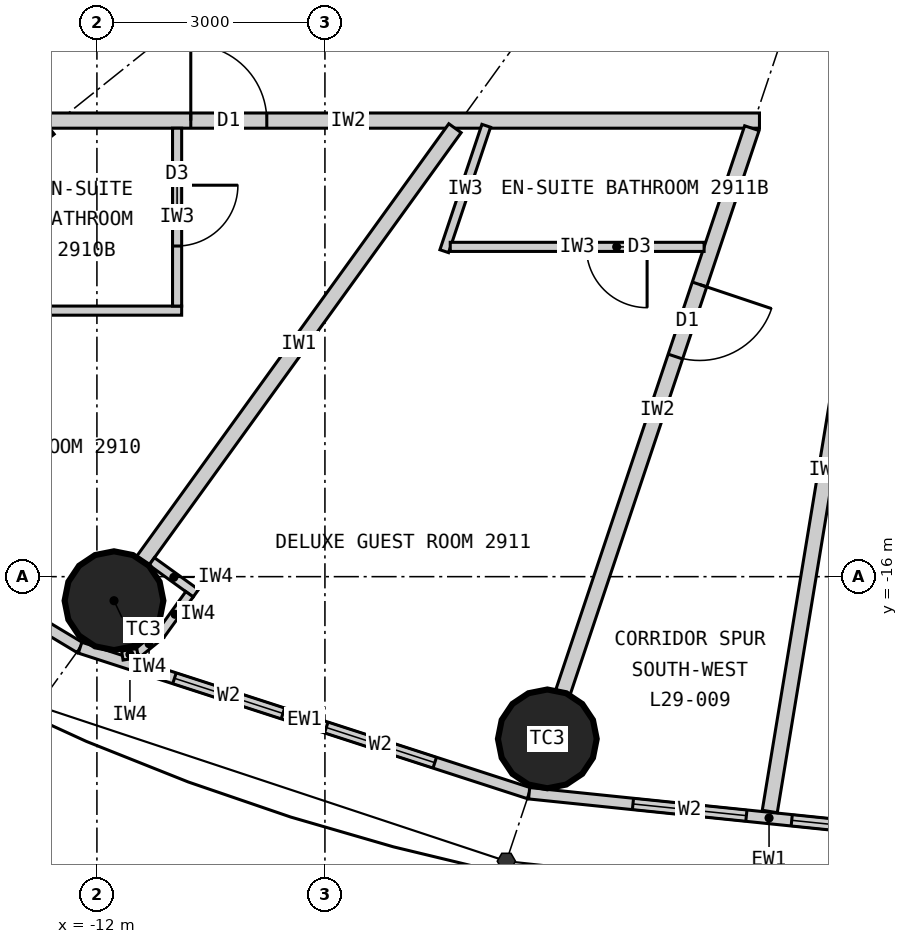
"""IFC4 building model, lengths in metres.
Left out: names, types, materials, properties, quantities, classifications, styles, units other than length and angle.
Written with IfcOpenShell. Run it as: python <this file> out.ifc"""

import sys

from ifc_helpers import new_model, si_unit, direction, frame, frame_2d, origin, origin_2d, place, context, subcontext, project, spatial, rectangle, circle, extrude, element, fill, save


model = new_model("IFC4")
c1 = context("Model", 3, precision=1e-05, world=origin(), true_north=direction((0.0, 1.0)))
c2 = subcontext(c1, "Body", "Model", "MODEL_VIEW")
j1 = project(units=[si_unit("LENGTHUNIT", "METRE"), si_unit("PLANEANGLEUNIT", "RADIAN")], contexts=[c1])
p1 = place(None, origin())
s1 = spatial("IfcSite", under=j1, at=p1, CompositionType="ELEMENT")
p2 = place(p1, origin())
s2 = spatial("IfcBuilding", under=s1, at=p2, CompositionType="ELEMENT")
p3 = place(p2, frame((0.0, 0.0, 115.5)))
s3 = spatial("IfcBuildingStorey", under=s2, at=p3, CompositionType="ELEMENT", Elevation=115.5)
for number, where, z_axis, x_axis in (
    (1, (-11.775, -16.316, 0.0), (0.0, 0.0, 1.0), (1.0, 0.0, 0.0)),
    (2, (-6.074, -18.135, 0.0), (0.0, 0.0, 1.0), (1.0, 0.0, 0.0)),
):
    element("IfcColumn", number, at=place(p3, frame(where, z_axis=z_axis, x_axis=x_axis)), inside=s3, PredefinedType="COLUMN", context=c2, shape_type="SweptSolid", body=[
        extrude(circle(Radius=0.65, at=origin_2d()), origin(), (0.0, 0.0, 1.0), 3.3),
    ])
p4 = place(p3, frame((-17.332, -13.866, 0.0), z_axis=(0.0, 0.0, 1.0), x_axis=(0.857308573723, -0.514802884044, 0.0)))
e3 = element("IfcWall", 3, at=p4, inside=s3, PredefinedType="ELEMENTEDWALL", context=c2, shape_type="SweptSolid", body=[
    extrude(rectangle(XDim=5.961, YDim=0.15, at=frame_2d((2.98, 0.0))), origin(), (0.0, 0.0, 1.0), 3.12),
])
p5 = place(p4, frame((1.181, 0.0, 0.9)))
e4 = element("IfcOpeningElement", 4, at=p5, cuts=e3, PredefinedType="OPENING", context=c2, shape_type="SweptSolid", body=[
    extrude(rectangle(XDim=1.5, YDim=1.9, at=frame_2d((0.75, 0.95))), frame((0.0, 0.085, 0.0), z_axis=(0.0, -1.0, 0.0), x_axis=(1.0, 0.0, 0.0)), (0.0, 0.0, 1.0), 0.17),
])
p6 = place(p4, frame((3.281, 0.0, 0.9)))
e5 = element("IfcOpeningElement", 5, at=p6, cuts=e3, PredefinedType="OPENING", context=c2, shape_type="SweptSolid", body=[
    extrude(rectangle(XDim=1.5, YDim=1.9, at=frame_2d((0.75, 0.95))), frame((0.0, 0.085, 0.0), z_axis=(0.0, -1.0, 0.0), x_axis=(1.0, 0.0, 0.0)), (0.0, 0.0, 1.0), 0.17),
])
p7 = place(p3, frame((-12.221, -16.935, 0.0), z_axis=(0.0, 0.0, 1.0), x_axis=(0.951272691506, -0.308350881944, 0.0)))
e6 = element("IfcWall", 6, at=p7, inside=s3, PredefinedType="ELEMENTEDWALL", context=c2, shape_type="SweptSolid", body=[
    extrude(rectangle(XDim=6.211, YDim=0.15, at=frame_2d((3.105, 0.0))), origin(), (0.0, 0.0, 1.0), 3.12),
])
p8 = place(p7, frame((1.305, 0.0, 0.9)))
e7 = element("IfcOpeningElement", 7, at=p8, cuts=e6, PredefinedType="OPENING", context=c2, shape_type="SweptSolid", body=[
    extrude(rectangle(XDim=1.5, YDim=1.9, at=frame_2d((0.75, 0.95))), frame((0.0, 0.085, 0.0), z_axis=(0.0, -1.0, 0.0), x_axis=(1.0, 0.0, 0.0)), (0.0, 0.0, 1.0), 0.17),
])
p9 = place(p7, frame((3.405, 0.0, 0.9)))
e8 = element("IfcOpeningElement", 8, at=p9, cuts=e6, PredefinedType="OPENING", context=c2, shape_type="SweptSolid", body=[
    extrude(rectangle(XDim=1.5, YDim=1.9, at=frame_2d((0.75, 0.95))), frame((0.0, 0.085, 0.0), z_axis=(0.0, -1.0, 0.0), x_axis=(1.0, 0.0, 0.0)), (0.0, 0.0, 1.0), 0.17),
])
p10 = place(p3, frame((-6.313, -18.85, 0.0), z_axis=(0.0, 0.0, 1.0), x_axis=(0.994735690163, -0.102473931887, 0.0)))
e9 = element("IfcWall", 9, at=p10, inside=s3, PredefinedType="ELEMENTEDWALL", context=c2, shape_type="SweptSolid", body=[
    extrude(rectangle(XDim=6.347, YDim=0.15, at=frame_2d((3.173, 0.0))), origin(), (0.0, 0.0, 1.0), 3.12),
])
p11 = place(p10, frame((1.373, 0.0, 0.9)))
e10 = element("IfcOpeningElement", 10, at=p11, cuts=e9, PredefinedType="OPENING", context=c2, shape_type="SweptSolid", body=[
    extrude(rectangle(XDim=1.5, YDim=1.9, at=frame_2d((0.75, 0.95))), frame((0.0, 0.085, 0.0), z_axis=(0.0, -1.0, 0.0), x_axis=(1.0, 0.0, 0.0)), (0.0, 0.0, 1.0), 0.17),
])
p12 = place(p10, frame((3.473, 0.0, 0.9)))
e11 = element("IfcOpeningElement", 11, at=p12, cuts=e9, PredefinedType="OPENING", context=c2, shape_type="SweptSolid", body=[
    extrude(rectangle(XDim=1.5, YDim=1.9, at=frame_2d((0.75, 0.95))), frame((0.0, 0.085, 0.0), z_axis=(0.0, -1.0, 0.0), x_axis=(1.0, 0.0, 0.0)), (0.0, 0.0, 1.0), 0.17),
])
p13 = place(p3, frame((-3.283, -10.0, 0.0), z_axis=(0.0, 0.0, 1.0), x_axis=(-1.0, 0.0, 0.0)))
e12 = element("IfcWall", 12, at=p13, inside=s3, PredefinedType="PARTITIONING", context=c2, shape_type="SweptSolid", body=[
    extrude(rectangle(XDim=10.817, YDim=0.2, at=frame_2d((5.409, 0.0))), origin(), (0.0, 0.0, 1.0), 3.12),
])
p14 = place(p13, frame((6.482, 0.0, 0.0)))
e13 = element("IfcOpeningElement", 13, at=p14, cuts=e12, PredefinedType="OPENING", context=c2, shape_type="SweptSolid", body=[
    extrude(rectangle(XDim=1.0, YDim=2.2, at=frame_2d((0.5, 1.1))), frame((0.0, 0.11, 0.0), z_axis=(0.0, -1.0, 0.0), x_axis=(1.0, 0.0, 0.0)), (0.0, 0.0, 1.0), 0.22),
])
p15 = place(p3, frame((-12.625, -10.1, 0.0), z_axis=(0.0, 0.0, 1.0), x_axis=(-0.780863644897, -0.624701503182, 0.0)))
e14 = element("IfcWall", 14, at=p15, inside=s3, PredefinedType="PARTITIONING", context=c2, shape_type="SweptSolid", body=[
    extrude(rectangle(XDim=4.612, YDim=0.2, at=frame_2d((2.306, 0.0))), origin(), (0.0, 0.0, 1.0), 2.37),
])
p16 = place(p3, frame((-7.289, -10.1, 0.0), z_axis=(0.0, 0.0, 1.0), x_axis=(-0.585217367024, -0.81087645997, 0.0)))
e15 = element("IfcWall", 15, at=p16, inside=s3, PredefinedType="PARTITIONING", context=c2, shape_type="SweptSolid", body=[
    extrude(rectangle(XDim=7.016, YDim=0.2, at=frame_2d((3.508, 0.0))), origin(), (0.0, 0.0, 1.0), 2.37),
])
p17 = place(p3, frame((-3.383, -10.1, 0.0), z_axis=(0.0, 0.0, 1.0), x_axis=(-0.317603705574, -0.948223542318, 0.0)))
e16 = element("IfcWall", 16, at=p17, inside=s3, PredefinedType="PARTITIONING", context=c2, shape_type="SweptSolid", body=[
    extrude(rectangle(XDim=7.823, YDim=0.2, at=frame_2d((3.912, 0.0))), origin(), (0.0, 0.0, 1.0), 2.37),
])
p18 = place(p17, frame((2.168, 0.0, 0.0)))
e17 = element("IfcOpeningElement", 17, at=p18, cuts=e16, PredefinedType="OPENING", context=c2, shape_type="SweptSolid", body=[
    extrude(rectangle(XDim=1.0, YDim=2.2, at=frame_2d((0.5, 1.1))), frame((0.0, 0.11, 0.0), z_axis=(0.0, -1.0, 0.0), x_axis=(1.0, 0.0, 0.0)), (0.0, 0.0, 1.0), 0.22),
])
p19 = place(p3, frame((-1.665, -10.1, 0.0), z_axis=(0.0, 0.0, 1.0), x_axis=(-0.162660519103, -0.986682094459, 0.0)))
e18 = element("IfcWall", 18, at=p19, inside=s3, PredefinedType="PARTITIONING", context=c2, shape_type="SweptSolid", body=[
    extrude(rectangle(XDim=9.111, YDim=0.2, at=frame_2d((4.555, 0.0))), origin(), (0.0, 0.0, 1.0), 3.12),
])
p20 = place(p19, frame((1.86, 0.0, 0.0)))
e19 = element("IfcOpeningElement", 19, at=p20, cuts=e18, PredefinedType="OPENING", context=c2, shape_type="SweptSolid", body=[
    extrude(rectangle(XDim=1.0, YDim=2.2, at=frame_2d((0.5, 1.1))), frame((0.0, 0.11, 0.0), z_axis=(0.0, -1.0, 0.0), x_axis=(1.0, 0.0, 0.0)), (0.0, 0.0, 1.0), 0.22),
])
p21 = place(p3, frame((-15.525, -12.5, 0.0), z_axis=(0.0, 0.0, 1.0), x_axis=(1.0, 0.0, 0.0)))
e20 = element("IfcWall", 20, at=p21, inside=s3, PredefinedType="PARTITIONING", context=c2, shape_type="SweptSolid", body=[
    extrude(rectangle(XDim=4.64, YDim=0.12, at=frame_2d((2.32, 0.0))), origin(), (0.0, 0.0, 1.0), 3.12),
])
p22 = place(p3, frame((-10.945, -10.1, 0.0), z_axis=(0.0, 0.0, 1.0), x_axis=(0.0, -1.0, 0.0)))
e21 = element("IfcWall", 21, at=p22, inside=s3, PredefinedType="PARTITIONING", context=c2, shape_type="SweptSolid", body=[
    extrude(rectangle(XDim=2.34, YDim=0.12, at=frame_2d((1.17, 0.0))), origin(), (0.0, 0.0, 1.0), 3.12),
])
p23 = place(p22, frame((0.75, 0.0, 0.0)))
e22 = element("IfcOpeningElement", 22, at=p23, cuts=e21, PredefinedType="OPENING", context=c2, shape_type="SweptSolid", body=[
    extrude(rectangle(XDim=0.8, YDim=2.1, at=frame_2d((0.4, 1.05))), frame((0.0, 0.07, 0.0), z_axis=(0.0, -1.0, 0.0), x_axis=(1.0, 0.0, 0.0)), (0.0, 0.0, 1.0), 0.14),
])
p24 = place(p3, frame((-6.878, -10.068, 0.0), z_axis=(0.0, 0.0, 1.0), x_axis=(-0.317532394508, -0.948247424694, 0.0)))
e23 = element("IfcWall", 23, at=p24, inside=s3, PredefinedType="PARTITIONING", context=c2, shape_type="SweptSolid", body=[
    extrude(rectangle(XDim=1.74, YDim=0.12, at=frame_2d((0.87, 0.0))), origin(), (0.0, 0.0, 1.0), 3.12),
])
p25 = place(p3, frame((-4.011, -11.661, 0.0), z_axis=(0.0, 0.0, 1.0), x_axis=(-1.0, 0.0, 0.0)))
e24 = element("IfcWall", 24, at=p25, inside=s3, PredefinedType="PARTITIONING", context=c2, shape_type="SweptSolid", body=[
    extrude(rectangle(XDim=3.34, YDim=0.12, at=frame_2d((1.67, 0.0))), origin(), (0.0, 0.0, 1.0), 3.12),
])
p26 = place(p25, frame((0.75, 0.0, 0.0)))
e25 = element("IfcOpeningElement", 25, at=p26, cuts=e24, PredefinedType="OPENING", context=c2, shape_type="SweptSolid", body=[
    extrude(rectangle(XDim=0.8, YDim=2.1, at=frame_2d((0.4, 1.05))), frame((0.0, 0.07, 0.0), z_axis=(0.0, -1.0, 0.0), x_axis=(1.0, 0.0, 0.0)), (0.0, 0.0, 1.0), 0.14),
])
p27 = place(p3, frame((-11.279, -15.799, 0.0), z_axis=(0.0, 0.0, 1.0), x_axis=(0.810912957127, -0.585166793285, 0.0)))
e26 = element("IfcWall", 26, at=p27, inside=s3, PredefinedType="PARTITIONING", context=c2, shape_type="SweptSolid", body=[
    extrude(rectangle(XDim=0.716, YDim=0.12, at=frame_2d((0.358, 0.0))), origin(), (0.0, 0.0, 1.0), 3.12),
])
p28 = place(p3, frame((-10.782, -16.231, 0.0), z_axis=(0.0, 0.0, 1.0), x_axis=(-0.585175102182, -0.810906961239, 0.0)))
e27 = element("IfcWall", 27, at=p28, inside=s3, PredefinedType="PARTITIONING", context=c2, shape_type="SweptSolid", body=[
    extrude(rectangle(XDim=0.65, YDim=0.12, at=frame_2d((0.325, 0.0))), origin(), (0.0, 0.0, 1.0), 3.12),
])
p29 = place(p3, frame((-11.162, -16.759, 0.0), z_axis=(0.0, 0.0, 1.0), x_axis=(-0.775178428527, -0.63174235567, 0.0)))
e28 = element("IfcWall", 28, at=p29, inside=s3, PredefinedType="PARTITIONING", context=c2, shape_type="SweptSolid", body=[
    extrude(rectangle(XDim=0.392, YDim=0.12, at=frame_2d((0.196, 0.0))), origin(), (0.0, 0.0, 1.0), 3.12),
])
p30 = place(p3, frame((-11.466, -17.006, 0.0), z_axis=(0.0, 0.0, 1.0), x_axis=(-0.987228877621, -0.15930832744, 0.0)))
e29 = element("IfcWall", 29, at=p30, inside=s3, PredefinedType="PARTITIONING", context=c2, shape_type="SweptSolid", body=[
    extrude(rectangle(XDim=0.202, YDim=0.12, at=frame_2d((0.101, 0.0))), origin(), (0.0, 0.0, 1.0), 3.12),
])
p31 = place(p8, origin())
e30 = element("IfcWindow", 30, at=p31, inside=s3, PartitioningType="SINGLE_PANEL", PredefinedType="WINDOW", context=c2, shape_type="SweptSolid", body=[
    extrude(rectangle(XDim=1.5, YDim=1.9, at=frame_2d((0.75, 0.95))), frame((0.0, 0.03, 0.0), z_axis=(0.0, -1.0, 0.0), x_axis=(1.0, 0.0, 0.0)), (0.0, 0.0, 1.0), 0.06),
])
fill(e7, e30)
p32 = place(p9, origin())
e31 = element("IfcWindow", 31, at=p32, inside=s3, PartitioningType="SINGLE_PANEL", PredefinedType="WINDOW", context=c2, shape_type="SweptSolid", body=[
    extrude(rectangle(XDim=1.5, YDim=1.9, at=frame_2d((0.75, 0.95))), frame((0.0, 0.03, 0.0), z_axis=(0.0, -1.0, 0.0), x_axis=(1.0, 0.0, 0.0)), (0.0, 0.0, 1.0), 0.06),
])
fill(e8, e31)
p33 = place(p11, origin())
e32 = element("IfcWindow", 32, at=p33, inside=s3, PartitioningType="SINGLE_PANEL", PredefinedType="WINDOW", context=c2, shape_type="SweptSolid", body=[
    extrude(rectangle(XDim=1.5, YDim=1.9, at=frame_2d((0.75, 0.95))), frame((0.0, 0.03, 0.0), z_axis=(0.0, -1.0, 0.0), x_axis=(1.0, 0.0, 0.0)), (0.0, 0.0, 1.0), 0.06),
])
fill(e10, e32)
p34 = place(p12, origin())
e33 = element("IfcWindow", 33, at=p34, inside=s3, PartitioningType="SINGLE_PANEL", PredefinedType="WINDOW", context=c2, shape_type="SweptSolid", body=[
    extrude(rectangle(XDim=1.5, YDim=1.9, at=frame_2d((0.75, 0.95))), frame((0.0, 0.03, 0.0), z_axis=(0.0, -1.0, 0.0), x_axis=(1.0, 0.0, 0.0)), (0.0, 0.0, 1.0), 0.06),
])
fill(e11, e33)
p35 = place(p23, origin())
e34 = element("IfcDoor", 34, at=p35, inside=s3, OperationType="SINGLE_SWING_LEFT", PredefinedType="DOOR", context=c2, shape_type="SweptSolid", body=[
    extrude(rectangle(XDim=0.8, YDim=2.1, at=frame_2d((0.4, 1.05))), frame((0.0, 0.025, 0.0), z_axis=(0.0, -1.0, 0.0), x_axis=(1.0, 0.0, 0.0)), (0.0, 0.0, 1.0), 0.05),
])
fill(e22, e34)
p36 = place(p14, origin())
e35 = element("IfcDoor", 35, at=p36, inside=s3, OperationType="SINGLE_SWING_RIGHT", PredefinedType="DOOR", context=c2, shape_type="SweptSolid", body=[
    extrude(rectangle(XDim=1.0, YDim=2.2, at=frame_2d((0.5, 1.1))), frame((0.0, 0.025, 0.0), z_axis=(0.0, -1.0, 0.0), x_axis=(1.0, 0.0, 0.0)), (0.0, 0.0, 1.0), 0.05),
])
fill(e13, e35)
p37 = place(p26, origin())
e36 = element("IfcDoor", 36, at=p37, inside=s3, OperationType="SINGLE_SWING_LEFT", PredefinedType="DOOR", context=c2, shape_type="SweptSolid", body=[
    extrude(rectangle(XDim=0.8, YDim=2.1, at=frame_2d((0.4, 1.05))), frame((0.0, 0.025, 0.0), z_axis=(0.0, -1.0, 0.0), x_axis=(1.0, 0.0, 0.0)), (0.0, 0.0, 1.0), 0.05),
])
fill(e25, e36)
p38 = place(p18, origin())
e37 = element("IfcDoor", 37, at=p38, inside=s3, OperationType="SINGLE_SWING_LEFT", PredefinedType="DOOR", context=c2, shape_type="SweptSolid", body=[
    extrude(rectangle(XDim=1.0, YDim=2.2, at=frame_2d((0.5, 1.1))), frame((0.0, 0.025, 0.0), z_axis=(0.0, -1.0, 0.0), x_axis=(1.0, 0.0, 0.0)), (0.0, 0.0, 1.0), 0.05),
])
fill(e17, e37)
save(model, sys.argv[1])
